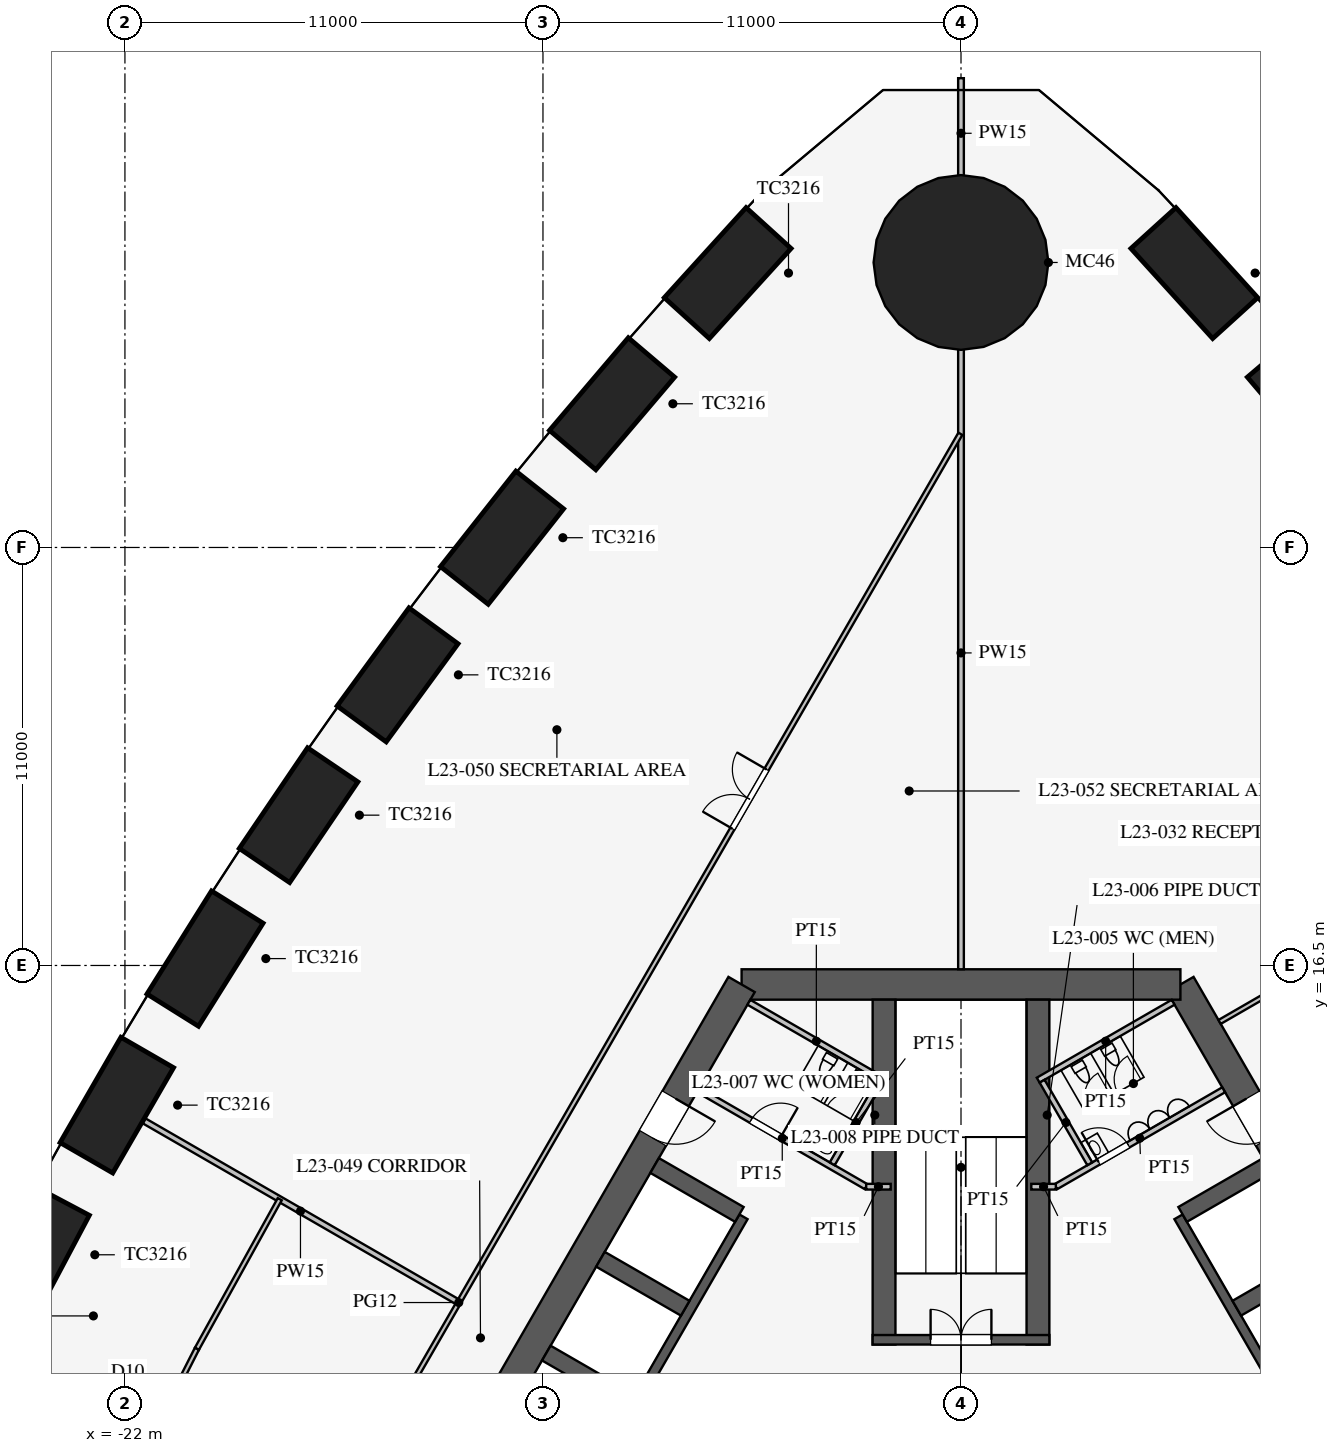
"""IFC4 building model, lengths in metres.
Left out: names, types, materials, properties, quantities, classifications, styles, units other than length and angle.
Written with IfcOpenShell. Run it as: python <this file> out.ifc"""

import sys

from ifc_helpers import new_model, si_unit, direction, frame, frame_2d, origin, origin_2d, place, context, subcontext, project, spatial, rectangle, circle, extrude, element, fill, save


model = new_model("IFC4")
c1 = context("Model", 3, precision=1e-05, world=origin(), true_north=direction((0.0, 1.0)))
c2 = subcontext(c1, "Body", "Model", "MODEL_VIEW")
j1 = project(units=[si_unit("LENGTHUNIT", "METRE"), si_unit("PLANEANGLEUNIT", "RADIAN")], contexts=[c1])
p1 = place(None, origin())
s1 = spatial("IfcSite", under=j1, at=p1, CompositionType="ELEMENT")
p2 = place(p1, origin())
s2 = spatial("IfcBuilding", under=s1, at=p2, CompositionType="ELEMENT")
p3 = place(p2, frame((0.0, 0.0, 103.1)))
s3 = spatial("IfcBuildingStorey", under=s2, at=p3, CompositionType="ELEMENT", Elevation=103.1)
for number, where, z_axis, x_axis in (
    (1, (9.182, 31.282, 0.0), (0.0, 0.0, 1.0), (-0.648, 0.762, 0.0)),
    (2, (6.139, 34.721, 0.0), (0.0, 0.0, 1.0), (-0.672, 0.74, 0.0)),
    (3, (-6.139, 34.721, 0.0), (0.0, 0.0, 1.0), (-0.672, -0.74, 0.0)),
    (4, (-9.182, 31.282, 0.0), (0.0, 0.0, 1.0), (-0.648, -0.762, 0.0)),
    (5, (-12.077, 27.757, 0.0), (0.0, 0.0, 1.0), (-0.62, -0.785, 0.0)),
    (6, (-14.825, 24.148, 0.0), (0.0, 0.0, 1.0), (-0.591, -0.807, 0.0)),
    (7, (-17.43, 20.456, 0.0), (0.0, 0.0, 1.0), (-0.561, -0.828, 0.0)),
    (8, (-19.893, 16.681, 0.0), (0.0, 0.0, 1.0), (-0.531, -0.847, 0.0)),
    (9, (-22.213, 12.825, 0.0), (0.0, 0.0, 1.0), (-0.5, -0.866, 0.0)),
    (10, (-24.393, 8.887, 0.0), (0.0, 0.0, 1.0), (-0.468, -0.883, 0.0)),
):
    element("IfcColumn", number, at=place(p3, frame(where, z_axis=z_axis, x_axis=x_axis)), inside=s3, PredefinedType="COLUMN", context=c2, shape_type="SweptSolid", body=[
        extrude(rectangle(XDim=3.2, YDim=1.6, at=origin_2d()), origin(), (0.0, 0.0, 1.0), 4.2),
    ])
p4 = place(p3, frame((0.0, 35.0, 0.0), z_axis=(0.0, 0.0, 1.0), x_axis=(1.0, 0.0, 0.0)))
e11 = element("IfcColumn", 11, at=p4, inside=s3, PredefinedType="COLUMN", context=c2, shape_type="SweptSolid", body=[
    extrude(circle(Radius=2.3, at=origin_2d()), origin(), (0.0, 0.0, 1.0), 4.2),
])
p5 = place(p3, frame((16.743, -3.0, 0.0), z_axis=(0.0, 0.0, 1.0), x_axis=(-0.500002442456, 0.866023993627, 0.0)))
e12 = element("IfcWall", 12, at=p5, inside=s3, PredefinedType="SHEAR", context=c2, shape_type="SweptSolid", body=[
    extrude(rectangle(XDim=21.939, YDim=0.8, at=frame_2d((10.97, 0.0))), origin(), (0.0, 0.0, 1.0), 4.2),
])
p6 = place(p5, frame((17.27, 0.0, 0.0)))
e13 = element("IfcOpeningElement", 13, at=p6, cuts=e12, PredefinedType="OPENING", context=c2, shape_type="SweptSolid", body=[
    extrude(rectangle(XDim=1.2, YDim=2.1, at=frame_2d((0.6, 1.05))), frame((0.0, 0.41, 0.0), z_axis=(0.0, -1.0, 0.0), x_axis=(1.0, 0.0, 0.0)), (0.0, 0.0, 1.0), 0.82),
])
p7 = place(p5, frame((3.47, 0.0, 0.0)))
e14 = element("IfcOpeningElement", 14, at=p7, cuts=e12, PredefinedType="OPENING", context=c2, shape_type="SweptSolid", body=[
    extrude(rectangle(XDim=1.2, YDim=2.1, at=frame_2d((0.6, 1.05))), frame((0.0, 0.41, 0.0), z_axis=(0.0, -1.0, 0.0), x_axis=(1.0, 0.0, 0.0)), (0.0, 0.0, 1.0), 0.82),
])
p8 = place(p3, frame((5.773, 16.0, 0.0), z_axis=(0.0, 0.0, 1.0), x_axis=(-1.0, 0.0, 0.0)))
e15 = element("IfcWall", 15, at=p8, inside=s3, PredefinedType="SHEAR", context=c2, shape_type="SweptSolid", body=[
    extrude(rectangle(XDim=11.547, YDim=0.8, at=frame_2d((5.773, 0.0))), origin(), (0.0, 0.0, 1.0), 4.2),
])
p9 = place(p3, frame((-5.773, 16.0, 0.0), z_axis=(0.0, 0.0, 1.0), x_axis=(-0.500002442456, -0.866023993627, 0.0)))
e16 = element("IfcWall", 16, at=p9, inside=s3, PredefinedType="SHEAR", context=c2, shape_type="SweptSolid", body=[
    extrude(rectangle(XDim=21.939, YDim=0.8, at=frame_2d((10.97, 0.0))), origin(), (0.0, 0.0, 1.0), 4.2),
])
p10 = place(p9, frame((17.27, 0.0, 0.0)))
e17 = element("IfcOpeningElement", 17, at=p10, cuts=e16, PredefinedType="OPENING", context=c2, shape_type="SweptSolid", body=[
    extrude(rectangle(XDim=1.2, YDim=2.1, at=frame_2d((0.6, 1.05))), frame((0.0, 0.41, 0.0), z_axis=(0.0, -1.0, 0.0), x_axis=(1.0, 0.0, 0.0)), (0.0, 0.0, 1.0), 0.82),
])
p11 = place(p9, frame((3.47, 0.0, 0.0)))
e18 = element("IfcOpeningElement", 18, at=p11, cuts=e16, PredefinedType="OPENING", context=c2, shape_type="SweptSolid", body=[
    extrude(rectangle(XDim=1.2, YDim=2.1, at=frame_2d((0.6, 1.05))), frame((0.0, 0.41, 0.0), z_axis=(0.0, -1.0, 0.0), x_axis=(1.0, 0.0, 0.0)), (0.0, 0.0, 1.0), 0.82),
])
p12 = place(p3, frame((11.424, 0.014, 0.0), z_axis=(0.0, 0.0, 1.0), x_axis=(-0.500001763848, 0.866024385424, 0.0)))
e19 = element("IfcWall", 19, at=p12, inside=s3, PredefinedType="SHEAR", context=c2, shape_type="SweptSolid", body=[
    extrude(rectangle(XDim=11.4, YDim=0.25, at=frame_2d((5.7, 0.0))), origin(), (0.0, 0.0, 1.0), 4.2),
])
p13 = place(p12, frame((0.975, 0.0, 0.0)))
e20 = element("IfcOpeningElement", 20, at=p13, cuts=e19, PredefinedType="OPENING", context=c2, shape_type="SweptSolid", body=[
    extrude(rectangle(XDim=0.9, YDim=2.1, at=frame_2d((0.45, 1.05))), frame((0.0, 0.135, 0.0), z_axis=(0.0, -1.0, 0.0), x_axis=(1.0, 0.0, 0.0)), (0.0, 0.0, 1.0), 0.27),
])
p14 = place(p12, frame((3.825, 0.0, 0.0)))
e21 = element("IfcOpeningElement", 21, at=p14, cuts=e19, PredefinedType="OPENING", context=c2, shape_type="SweptSolid", body=[
    extrude(rectangle(XDim=0.9, YDim=2.1, at=frame_2d((0.45, 1.05))), frame((0.0, 0.135, 0.0), z_axis=(0.0, -1.0, 0.0), x_axis=(1.0, 0.0, 0.0)), (0.0, 0.0, 1.0), 0.27),
])
p15 = place(p3, frame((7.257, 7.481, 0.0), z_axis=(0.0, 0.0, 1.0), x_axis=(0.866046643894, 0.499963209246, 0.0)))
e22 = element("IfcWall", 22, at=p15, inside=s3, PredefinedType="SHEAR", context=c2, shape_type="SweptSolid", body=[
    extrude(rectangle(XDim=2.575, YDim=0.45, at=frame_2d((1.288, 0.0))), origin(), (0.0, 0.0, 1.0), 4.2),
])
p16 = place(p3, frame((5.832, 9.949, 0.0), z_axis=(0.0, 0.0, 1.0), x_axis=(0.866029291668, 0.499993265928, 0.0)))
e23 = element("IfcWall", 23, at=p16, inside=s3, PredefinedType="SHEAR", context=c2, shape_type="SweptSolid", body=[
    extrude(rectangle(XDim=2.575, YDim=0.45, at=frame_2d((1.288, 0.0))), origin(), (0.0, 0.0, 1.0), 4.2),
])
p17 = place(p3, frame((-5.724, 9.886, 0.0), z_axis=(0.0, 0.0, 1.0), x_axis=(-0.500001763848, -0.866024385424, 0.0)))
e24 = element("IfcWall", 24, at=p17, inside=s3, PredefinedType="SHEAR", context=c2, shape_type="SweptSolid", body=[
    extrude(rectangle(XDim=11.4, YDim=0.25, at=frame_2d((5.7, 0.0))), origin(), (0.0, 0.0, 1.0), 4.2),
])
p18 = place(p17, frame((6.525, 0.0, 0.0)))
e25 = element("IfcOpeningElement", 25, at=p18, cuts=e24, PredefinedType="OPENING", context=c2, shape_type="SweptSolid", body=[
    extrude(rectangle(XDim=1.2, YDim=2.2, at=frame_2d((0.6, 1.1))), frame((0.0, 0.135, 0.0), z_axis=(0.0, -1.0, 0.0), x_axis=(1.0, 0.0, 0.0)), (0.0, 0.0, 1.0), 0.27),
])
p19 = place(p17, frame((9.375, 0.0, 0.0)))
e26 = element("IfcOpeningElement", 26, at=p19, cuts=e24, PredefinedType="OPENING", context=c2, shape_type="SweptSolid", body=[
    extrude(rectangle(XDim=1.2, YDim=2.2, at=frame_2d((0.6, 1.1))), frame((0.0, 0.135, 0.0), z_axis=(0.0, -1.0, 0.0), x_axis=(1.0, 0.0, 0.0)), (0.0, 0.0, 1.0), 0.27),
])
p20 = place(p3, frame((-5.832, 9.949, 0.0), z_axis=(0.0, 0.0, 1.0), x_axis=(-0.866029291668, 0.499993265928, 0.0)))
e27 = element("IfcWall", 27, at=p20, inside=s3, PredefinedType="SHEAR", context=c2, shape_type="SweptSolid", body=[
    extrude(rectangle(XDim=2.575, YDim=0.45, at=frame_2d((1.288, 0.0))), origin(), (0.0, 0.0, 1.0), 4.2),
])
for number, where, z_axis, x_axis in (
    (28, (-7.257, 7.481, 0.0), (0.0, 0.0, 1.0), (-0.866, 0.5, 0.0)),
    (29, (-8.682, 5.012, 0.0), (0.0, 0.0, 1.0), (-0.866, 0.5, 0.0)),
):
    element("IfcWall", number, at=place(p3, frame(where, z_axis=z_axis, x_axis=x_axis)), inside=s3, PredefinedType="SHEAR", context=c2, shape_type="SweptSolid", body=[
        extrude(rectangle(XDim=2.575, YDim=0.45, at=frame_2d((1.288, 0.0))), origin(), (0.0, 0.0, 1.0), 4.2),
    ])
for number, where, z_axis, x_axis in (
    (30, (2.025, 6.525, 0.0), (0.0, 0.0, 1.0), (0.0, 1.0, 0.0)),
    (31, (-2.025, 6.525, 0.0), (0.0, 0.0, 1.0), (0.0, 1.0, 0.0)),
):
    element("IfcWall", number, at=place(p3, frame(where, z_axis=z_axis, x_axis=x_axis)), inside=s3, PredefinedType="SHEAR", context=c2, shape_type="SweptSolid", body=[
        extrude(rectangle(XDim=9.075, YDim=0.6, at=frame_2d((4.538, 0.0))), origin(), (0.0, 0.0, 1.0), 4.2),
    ])
p21 = place(p3, frame((2.325, 6.65, 0.0), z_axis=(0.0, 0.0, 1.0), x_axis=(-1.0, 0.0, 0.0)))
e32 = element("IfcWall", 32, at=p21, inside=s3, PredefinedType="SHEAR", context=c2, shape_type="SweptSolid", body=[
    extrude(rectangle(XDim=4.65, YDim=0.25, at=frame_2d((2.325, 0.0))), origin(), (0.0, 0.0, 1.0), 4.2),
])
p22 = place(p21, frame((1.525, 0.0, 0.0)))
e33 = element("IfcOpeningElement", 33, at=p22, cuts=e32, PredefinedType="OPENING", context=c2, shape_type="SweptSolid", body=[
    extrude(rectangle(XDim=1.6, YDim=2.1, at=frame_2d((0.8, 1.05))), frame((0.0, 0.135, 0.0), z_axis=(0.0, -1.0, 0.0), x_axis=(1.0, 0.0, 0.0)), (0.0, 0.0, 1.0), 0.27),
])
p23 = place(p3, frame((2.495, 10.678, 0.0), z_axis=(0.0, 0.0, 1.0), x_axis=(0.86602216432, 0.500005610874, 0.0)))
e34 = element("IfcWall", 34, at=p23, inside=s3, PredefinedType="PARTITIONING", context=c2, shape_type="SweptSolid", body=[
    extrude(rectangle(XDim=5.1, YDim=0.15, at=frame_2d((2.55, 0.0))), origin(), (0.0, 0.0, 1.0), 4.0),
])
p24 = place(p23, frame((1.3, 0.0, 0.0)))
e35 = element("IfcOpeningElement", 35, at=p24, cuts=e34, PredefinedType="OPENING", context=c2, shape_type="SweptSolid", body=[
    extrude(rectangle(XDim=0.9, YDim=2.1, at=frame_2d((0.45, 1.05))), frame((0.0, 0.085, 0.0), z_axis=(0.0, -1.0, 0.0), x_axis=(1.0, 0.0, 0.0)), (0.0, 0.0, 1.0), 0.17),
])
p25 = place(p3, frame((-2.495, 10.678, 0.0), z_axis=(0.0, 0.0, 1.0), x_axis=(-0.86602216432, 0.500005610874, 0.0)))
e36 = element("IfcWall", 36, at=p25, inside=s3, PredefinedType="PARTITIONING", context=c2, shape_type="SweptSolid", body=[
    extrude(rectangle(XDim=5.1, YDim=0.15, at=frame_2d((2.55, 0.0))), origin(), (0.0, 0.0, 1.0), 4.0),
])
p26 = place(p25, frame((2.6, 0.0, 0.0)))
e37 = element("IfcOpeningElement", 37, at=p26, cuts=e36, PredefinedType="OPENING", context=c2, shape_type="SweptSolid", body=[
    extrude(rectangle(XDim=0.9, YDim=2.1, at=frame_2d((0.45, 1.05))), frame((0.0, 0.085, 0.0), z_axis=(0.0, -1.0, 0.0), x_axis=(1.0, 0.0, 0.0)), (0.0, 0.0, 1.0), 0.17),
])
for number, where, z_axis, x_axis in (
    (38, (2.495, 10.678, 0.0), (0.0, 0.0, 1.0), (-1.0, 0.0, 0.0)),
    (39, (-2.495, 10.678, 0.0), (0.0, 0.0, 1.0), (1.0, 0.0, 0.0)),
):
    element("IfcWall", number, at=place(p3, frame(where, z_axis=z_axis, x_axis=x_axis)), inside=s3, PredefinedType="PARTITIONING", context=c2, shape_type="SweptSolid", body=[
        extrude(rectangle(XDim=0.645, YDim=0.15, at=frame_2d((0.323, 0.0))), origin(), (0.0, 0.0, 1.0), 4.0),
    ])
p27 = place(p3, frame((2.031, 13.482, 0.0), z_axis=(0.0, 0.0, 1.0), x_axis=(0.866050731258, 0.499956128963, 0.0)))
e40 = element("IfcWall", 40, at=p27, inside=s3, PredefinedType="PARTITIONING", context=c2, shape_type="SweptSolid", body=[
    extrude(rectangle(XDim=4.1, YDim=0.15, at=frame_2d((2.05, 0.0))), origin(), (0.0, 0.0, 1.0), 4.0),
])
p28 = place(p3, frame((3.389, 11.281, 0.0), z_axis=(0.0, 0.0, 1.0), x_axis=(-0.499989096993, 0.866031698547, 0.0)))
e41 = element("IfcWall", 41, at=p28, inside=s3, PredefinedType="PARTITIONING", context=c2, shape_type="SweptSolid", body=[
    extrude(rectangle(XDim=2.51, YDim=0.15, at=frame_2d((1.255, 0.0))), origin(), (0.0, 0.0, 1.0), 4.0),
])
p29 = place(p3, frame((-2.031, 13.482, 0.0), z_axis=(0.0, 0.0, 1.0), x_axis=(-0.866050731258, 0.499956128963, 0.0)))
e42 = element("IfcWall", 42, at=p29, inside=s3, PredefinedType="PARTITIONING", context=c2, shape_type="SweptSolid", body=[
    extrude(rectangle(XDim=4.1, YDim=0.15, at=frame_2d((2.05, 0.0))), origin(), (0.0, 0.0, 1.0), 4.0),
])
p30 = place(p3, frame((-3.389, 11.281, 0.0), z_axis=(0.0, 0.0, 1.0), x_axis=(0.499989096993, 0.866031698547, 0.0)))
e43 = element("IfcWall", 43, at=p30, inside=s3, PredefinedType="PARTITIONING", context=c2, shape_type="SweptSolid", body=[
    extrude(rectangle(XDim=2.51, YDim=0.15, at=frame_2d((1.255, 0.0))), origin(), (0.0, 0.0, 1.0), 4.0),
])
p31 = place(p3, frame((0.0, 16.4, 0.0), z_axis=(0.0, 0.0, 1.0), x_axis=(0.0, 1.0, 0.0)))
e44 = element("IfcWall", 44, at=p31, inside=s3, PredefinedType="PARTITIONING", context=c2, shape_type="SweptSolid", body=[
    extrude(rectangle(XDim=16.65, YDim=0.15, at=frame_2d((8.325, 0.0))), origin(), (0.0, 0.0, 1.0), 2.3),
])
p32 = place(p3, frame((0.0, 36.95, 0.0), z_axis=(0.0, 0.0, 1.0), x_axis=(0.0, 1.0, 0.0)))
e45 = element("IfcWall", 45, at=p32, inside=s3, PredefinedType="PARTITIONING", context=c2, shape_type="SweptSolid", body=[
    extrude(rectangle(XDim=2.899, YDim=0.15, at=frame_2d((1.45, 0.0))), origin(), (0.0, 0.0, 1.0), 2.3),
])
p33 = place(p3, frame((6.805, 15.014, 0.0), z_axis=(0.0, 0.0, 1.0), x_axis=(0.866031096941, 0.499990139034, 0.0)))
e46 = element("IfcWall", 46, at=p33, inside=s3, PredefinedType="PARTITIONING", context=c2, shape_type="SweptSolid", body=[
    extrude(rectangle(XDim=4.5, YDim=0.12, at=frame_2d((2.25, 0.0))), origin(), (0.0, 0.0, 1.0), 2.9),
])
p34 = place(p3, frame((-13.268, 7.66, 0.0), z_axis=(0.0, 0.0, 1.0), x_axis=(-0.866013963754, 0.500019814191, 0.0)))
e47 = element("IfcWall", 47, at=p34, inside=s3, PredefinedType="PARTITIONING", context=c2, shape_type="SweptSolid", body=[
    extrude(rectangle(XDim=9.5, YDim=0.15, at=frame_2d((4.75, 0.0))), origin(), (0.0, 0.0, 1.0), 2.4),
])
p35 = place(p3, frame((-0.016, 30.491, 0.0), z_axis=(0.0, 0.0, 1.0), x_axis=(-0.50000091641, -0.866024874695, 0.0)))
e48 = element("IfcWall", 48, at=p35, inside=s3, PredefinedType="PARTITIONING", context=c2, shape_type="SweptSolid", body=[
    extrude(rectangle(XDim=52.796, YDim=0.12, at=frame_2d((26.398, 0.0))), origin(), (0.0, 0.0, 1.0), 2.9),
])
p36 = place(p35, frame((10.2, 0.0, 0.15)))
e49 = element("IfcOpeningElement", 49, at=p36, cuts=e48, PredefinedType="OPENING", context=c2, shape_type="SweptSolid", body=[
    extrude(rectangle(XDim=1.8, YDim=2.1, at=frame_2d((0.9, 1.05))), frame((0.0, 0.07, 0.0), z_axis=(0.0, -1.0, 0.0), x_axis=(1.0, 0.0, 0.0)), (0.0, 0.0, 1.0), 0.14),
])
p37 = place(p35, frame((40.8, 0.0, 0.15)))
e50 = element("IfcOpeningElement", 50, at=p37, cuts=e48, PredefinedType="OPENING", context=c2, shape_type="SweptSolid", body=[
    extrude(rectangle(XDim=1.8, YDim=2.1, at=frame_2d((0.9, 1.05))), frame((0.0, 0.07, 0.0), z_axis=(0.0, -1.0, 0.0), x_axis=(1.0, 0.0, 0.0)), (0.0, 0.0, 1.0), 0.14),
])
p38 = place(p3, frame((-17.927, 10.35, 0.0), z_axis=(0.0, 0.0, 1.0), x_axis=(-0.484292898211, -0.874905931368, 0.0)))
e51 = element("IfcWall", 51, at=p38, inside=s3, PredefinedType="PARTITIONING", context=c2, shape_type="SweptSolid", body=[
    extrude(rectangle(XDim=4.501, YDim=0.12, at=frame_2d((2.25, 0.0))), origin(), (0.0, 0.0, 1.0), 2.9),
])
p39 = place(p3, frame((-20.106, 6.412, 0.0), z_axis=(0.0, 0.0, 1.0), x_axis=(-0.452471679136, -0.891778772779, 0.0)))
e52 = element("IfcWall", 52, at=p39, inside=s3, PredefinedType="PARTITIONING", context=c2, shape_type="SweptSolid", body=[
    extrude(rectangle(XDim=4.507, YDim=0.12, at=frame_2d((2.253, 0.0))), origin(), (0.0, 0.0, 1.0), 2.9),
])
p40 = place(p39, frame((1.35, 0.0, 0.15)))
e53 = element("IfcOpeningElement", 53, at=p40, cuts=e52, PredefinedType="OPENING", context=c2, shape_type="SweptSolid", body=[
    extrude(rectangle(XDim=1.8, YDim=2.1, at=frame_2d((0.9, 1.05))), frame((0.0, 0.07, 0.0), z_axis=(0.0, -1.0, 0.0), x_axis=(1.0, 0.0, 0.0)), (0.0, 0.0, 1.0), 0.14),
])
p41 = place(p24, origin())
e54 = element("IfcDoor", 54, at=p41, inside=s3, OperationType="SINGLE_SWING_LEFT", PredefinedType="DOOR", context=c2, shape_type="SweptSolid", body=[
    extrude(rectangle(XDim=0.9, YDim=2.1, at=frame_2d((0.45, 1.05))), frame((0.0, 0.025, 0.0), z_axis=(0.0, -1.0, 0.0), x_axis=(1.0, 0.0, 0.0)), (0.0, 0.0, 1.0), 0.05),
])
fill(e35, e54)
p42 = place(p26, frame((0.9, 0.0, 0.0), z_axis=(0.0, 0.0, 1.0), x_axis=(-1.0, 0.0, 0.0)))
e55 = element("IfcDoor", 55, at=p42, inside=s3, OperationType="SINGLE_SWING_RIGHT", PredefinedType="DOOR", context=c2, shape_type="SweptSolid", body=[
    extrude(rectangle(XDim=0.9, YDim=2.1, at=frame_2d((0.45, 1.05))), frame((0.0, 0.025, 0.0), z_axis=(0.0, -1.0, 0.0), x_axis=(1.0, 0.0, 0.0)), (0.0, 0.0, 1.0), 0.05),
])
fill(e37, e55)
p43 = place(p22, frame((1.6, 0.0, 0.0), z_axis=(0.0, 0.0, 1.0), x_axis=(-1.0, 0.0, 0.0)))
e56 = element("IfcDoor", 56, at=p43, inside=s3, OperationType="DOUBLE_DOOR_SINGLE_SWING", PredefinedType="DOOR", context=c2, shape_type="SweptSolid", body=[
    extrude(rectangle(XDim=1.6, YDim=2.1, at=frame_2d((0.8, 1.05))), frame((0.0, 0.025, 0.0), z_axis=(0.0, -1.0, 0.0), x_axis=(1.0, 0.0, 0.0)), (0.0, 0.0, 1.0), 0.05),
])
fill(e33, e56)
p44 = place(p6, origin())
e57 = element("IfcDoor", 57, at=p44, inside=s3, OperationType="SINGLE_SWING_RIGHT", PredefinedType="DOOR", context=c2, shape_type="SweptSolid", body=[
    extrude(rectangle(XDim=1.2, YDim=2.1, at=frame_2d((0.6, 1.05))), frame((0.0, 0.025, 0.0), z_axis=(0.0, -1.0, 0.0), x_axis=(1.0, 0.0, 0.0)), (0.0, 0.0, 1.0), 0.05),
])
fill(e13, e57)
p45 = place(p11, origin())
e58 = element("IfcDoor", 58, at=p45, inside=s3, OperationType="SINGLE_SWING_LEFT", PredefinedType="DOOR", context=c2, shape_type="SweptSolid", body=[
    extrude(rectangle(XDim=1.2, YDim=2.1, at=frame_2d((0.6, 1.05))), frame((0.0, 0.025, 0.0), z_axis=(0.0, -1.0, 0.0), x_axis=(1.0, 0.0, 0.0)), (0.0, 0.0, 1.0), 0.05),
])
fill(e18, e58)
p46 = place(p36, frame((1.8, 0.0, 0.0), z_axis=(0.0, 0.0, 1.0), x_axis=(-1.0, 0.0, 0.0)))
e59 = element("IfcDoor", 59, at=p46, inside=s3, OperationType="DOUBLE_DOOR_SINGLE_SWING", PredefinedType="DOOR", context=c2, shape_type="SweptSolid", body=[
    extrude(rectangle(XDim=1.8, YDim=2.1, at=frame_2d((0.9, 1.05))), frame((0.0, 0.025, 0.0), z_axis=(0.0, -1.0, 0.0), x_axis=(1.0, 0.0, 0.0)), (0.0, 0.0, 1.0), 0.05),
])
fill(e49, e59)
save(model, sys.argv[1])
